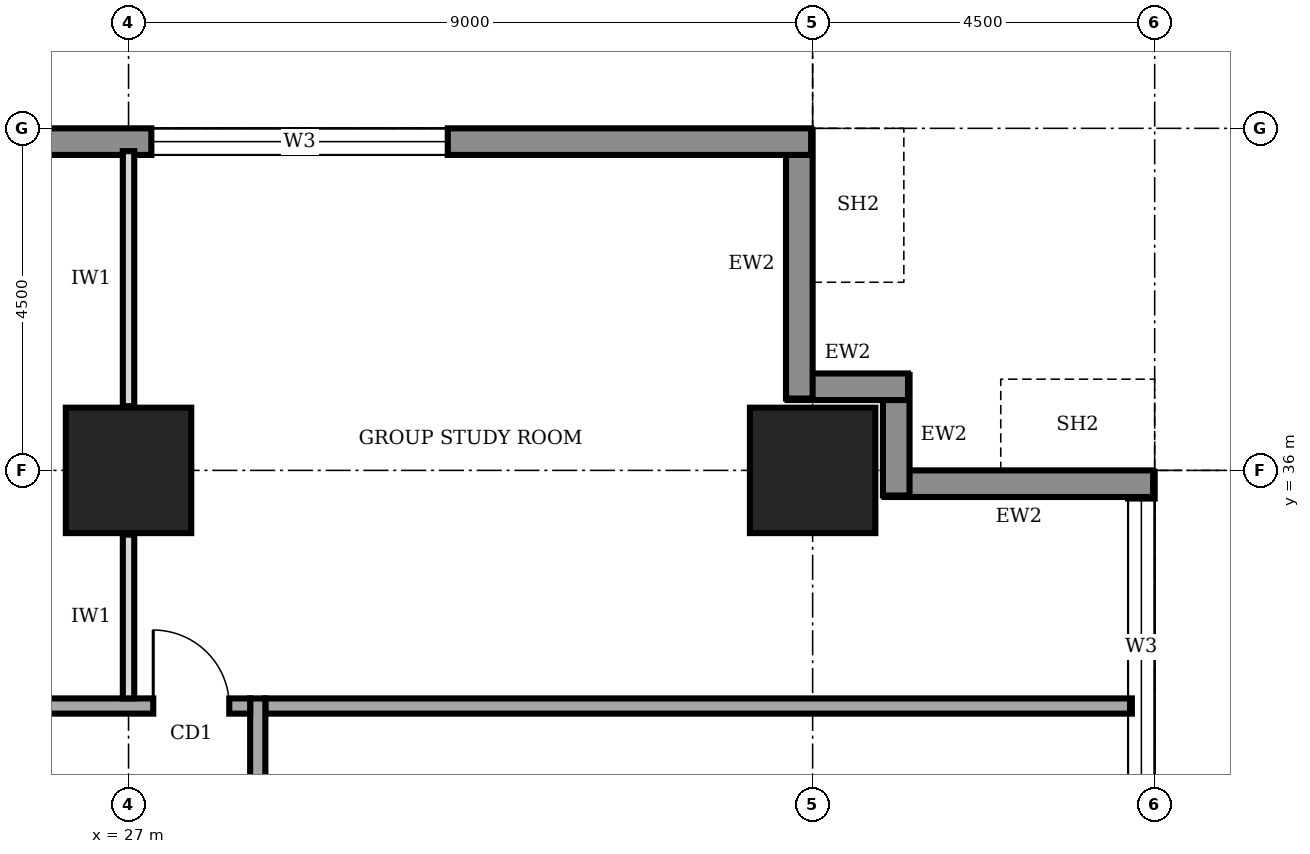
"""IFC4 building model, lengths in metres.
Left out: names, types, materials, properties, quantities, classifications, styles, units other than length and angle.
Written with IfcOpenShell. Run it as: python <this file> out.ifc"""

import sys

from ifc_helpers import new_model, si_unit, direction, frame, frame_2d, origin, origin_2d, place, context, subcontext, project, spatial, rectangle, extrude, element, fill, save


model = new_model("IFC4")
c1 = context("Model", 3, precision=1e-05, world=origin(), true_north=direction((0.0, 1.0)))
c2 = subcontext(c1, "Body", "Model", "MODEL_VIEW")
j1 = project(units=[si_unit("LENGTHUNIT", "METRE"), si_unit("PLANEANGLEUNIT", "RADIAN")], contexts=[c1])
p1 = place(None, origin())
s1 = spatial("IfcSite", under=j1, at=p1, CompositionType="ELEMENT")
p2 = place(p1, origin())
s2 = spatial("IfcBuilding", under=s1, at=p2, CompositionType="ELEMENT")
p3 = place(p2, frame((0.0, 0.0, 197.0)))
s3 = spatial("IfcBuildingStorey", under=s2, at=p3, CompositionType="ELEMENT", Elevation=197.0)
for number, where, z_axis, x_axis in (
    (1, (27.0, 36.0, 0.0), (0.0, 0.0, 1.0), (1.0, 0.0, 0.0)),
    (2, (36.0, 36.0, 0.0), (0.0, 0.0, 1.0), (1.0, 0.0, 0.0)),
):
    element("IfcColumn", number, at=place(p3, frame(where, z_axis=z_axis, x_axis=x_axis)), inside=s3, PredefinedType="COLUMN", context=c2, shape_type="SweptSolid", body=[
        extrude(rectangle(XDim=1.65, YDim=1.65, at=origin_2d()), origin(), (0.0, 0.0, 1.0), 4.0),
    ])
p4 = place(p3, frame((40.325, 4.52, 0.0), z_axis=(0.0, 0.0, 1.0), x_axis=(0.0, 1.0, 0.0)))
e3 = element("IfcWall", 3, at=p4, inside=s3, PredefinedType="STANDARD", context=c2, shape_type="SweptSolid", body=[
    extrude(rectangle(XDim=31.46, YDim=0.35, at=frame_2d((15.73, 0.0))), origin(), (0.0, 0.0, 1.0), 3.75),
])
p5 = place(p4, frame((4.78, 0.0, 0.95)))
e4 = element("IfcOpeningElement", 4, at=p5, cuts=e3, PredefinedType="OPENING", context=c2, shape_type="SweptSolid", body=[
    extrude(rectangle(XDim=3.9, YDim=1.8, at=frame_2d((1.95, 0.9))), frame((0.0, 0.185, 0.0), z_axis=(0.0, -1.0, 0.0), x_axis=(1.0, 0.0, 0.0)), (0.0, 0.0, 1.0), 0.37),
])
p6 = place(p4, frame((9.28, 0.0, 0.95)))
e5 = element("IfcOpeningElement", 5, at=p6, cuts=e3, PredefinedType="OPENING", context=c2, shape_type="SweptSolid", body=[
    extrude(rectangle(XDim=3.9, YDim=1.8, at=frame_2d((1.95, 0.9))), frame((0.0, 0.185, 0.0), z_axis=(0.0, -1.0, 0.0), x_axis=(1.0, 0.0, 0.0)), (0.0, 0.0, 1.0), 0.37),
])
p7 = place(p4, frame((13.78, 0.0, 0.95)))
e6 = element("IfcOpeningElement", 6, at=p7, cuts=e3, PredefinedType="OPENING", context=c2, shape_type="SweptSolid", body=[
    extrude(rectangle(XDim=3.9, YDim=1.8, at=frame_2d((1.95, 0.9))), frame((0.0, 0.185, 0.0), z_axis=(0.0, -1.0, 0.0), x_axis=(1.0, 0.0, 0.0)), (0.0, 0.0, 1.0), 0.37),
])
p8 = place(p4, frame((18.28, 0.0, 0.95)))
e7 = element("IfcOpeningElement", 7, at=p8, cuts=e3, PredefinedType="OPENING", context=c2, shape_type="SweptSolid", body=[
    extrude(rectangle(XDim=3.9, YDim=1.8, at=frame_2d((1.95, 0.9))), frame((0.0, 0.185, 0.0), z_axis=(0.0, -1.0, 0.0), x_axis=(1.0, 0.0, 0.0)), (0.0, 0.0, 1.0), 0.37),
])
p9 = place(p4, frame((22.78, 0.0, 0.95)))
e8 = element("IfcOpeningElement", 8, at=p9, cuts=e3, PredefinedType="OPENING", context=c2, shape_type="SweptSolid", body=[
    extrude(rectangle(XDim=3.9, YDim=1.8, at=frame_2d((1.95, 0.9))), frame((0.0, 0.185, 0.0), z_axis=(0.0, -1.0, 0.0), x_axis=(1.0, 0.0, 0.0)), (0.0, 0.0, 1.0), 0.37),
])
p10 = place(p4, frame((27.21, 0.0, 0.95)))
e9 = element("IfcOpeningElement", 9, at=p10, cuts=e3, PredefinedType="OPENING", context=c2, shape_type="SweptSolid", body=[
    extrude(rectangle(XDim=3.9, YDim=1.8, at=frame_2d((1.95, 0.9))), frame((0.0, 0.185, 0.0), z_axis=(0.0, -1.0, 0.0), x_axis=(1.0, 0.0, 0.0)), (0.0, 0.0, 1.0), 0.37),
])
p11 = place(p3, frame((40.48, 35.825, 0.0), z_axis=(0.0, 0.0, 1.0), x_axis=(-1.0, 0.0, 0.0)))
e10 = element("IfcWall", 10, at=p11, inside=s3, PredefinedType="STANDARD", context=c2, shape_type="SweptSolid", body=[
    extrude(rectangle(XDim=3.535, YDim=0.35, at=frame_2d((1.768, 0.0))), origin(), (0.0, 0.0, 1.0), 2.85),
])
for number, where, z_axis, x_axis in (
    (11, (37.1, 35.67, 0.0), (0.0, 0.0, 1.0), (0.0, 1.0, 0.0)),
    (12, (37.255, 37.1, 0.0), (0.0, 0.0, 1.0), (-1.0, 0.0, 0.0)),
):
    element("IfcWall", number, at=place(p3, frame(where, z_axis=z_axis, x_axis=x_axis)), inside=s3, PredefinedType="STANDARD", context=c2, shape_type="SweptSolid", body=[
        extrude(rectangle(XDim=1.585, YDim=0.35, at=frame_2d((0.792, 0.0))), origin(), (0.0, 0.0, 1.0), 3.75),
    ])
p12 = place(p3, frame((35.825, 36.945, 0.0), z_axis=(0.0, 0.0, 1.0), x_axis=(0.0, 1.0, 0.0)))
e13 = element("IfcWall", 13, at=p12, inside=s3, PredefinedType="STANDARD", context=c2, shape_type="SweptSolid", body=[
    extrude(rectangle(XDim=3.535, YDim=0.35, at=frame_2d((1.768, 0.0))), origin(), (0.0, 0.0, 1.0), 2.85),
])
p13 = place(p3, frame((35.98, 40.325, 0.0), z_axis=(0.0, 0.0, 1.0), x_axis=(-1.0, 0.0, 0.0)))
e14 = element("IfcWall", 14, at=p13, inside=s3, PredefinedType="STANDARD", context=c2, shape_type="SweptSolid", body=[
    extrude(rectangle(XDim=31.46, YDim=0.35, at=frame_2d((15.73, 0.0))), origin(), (0.0, 0.0, 1.0), 3.75),
])
p14 = place(p13, frame((27.21, 0.0, 0.95)))
e15 = element("IfcOpeningElement", 15, at=p14, cuts=e14, PredefinedType="OPENING", context=c2, shape_type="SweptSolid", body=[
    extrude(rectangle(XDim=3.9, YDim=1.8, at=frame_2d((1.95, 0.9))), frame((0.0, 0.185, 0.0), z_axis=(0.0, -1.0, 0.0), x_axis=(1.0, 0.0, 0.0)), (0.0, 0.0, 1.0), 0.37),
])
p15 = place(p13, frame((22.78, 0.0, 0.95)))
e16 = element("IfcOpeningElement", 16, at=p15, cuts=e14, PredefinedType="OPENING", context=c2, shape_type="SweptSolid", body=[
    extrude(rectangle(XDim=3.9, YDim=1.8, at=frame_2d((1.95, 0.9))), frame((0.0, 0.185, 0.0), z_axis=(0.0, -1.0, 0.0), x_axis=(1.0, 0.0, 0.0)), (0.0, 0.0, 1.0), 0.37),
])
p16 = place(p13, frame((4.78, 0.0, 0.95)))
e17 = element("IfcOpeningElement", 17, at=p16, cuts=e14, PredefinedType="OPENING", context=c2, shape_type="SweptSolid", body=[
    extrude(rectangle(XDim=3.9, YDim=1.8, at=frame_2d((1.95, 0.9))), frame((0.0, 0.185, 0.0), z_axis=(0.0, -1.0, 0.0), x_axis=(1.0, 0.0, 0.0)), (0.0, 0.0, 1.0), 0.37),
])
p17 = place(p3, frame((28.7, 7.7, 0.0), z_axis=(0.0, 0.0, 1.0), x_axis=(0.0, 1.0, 0.0)))
e18 = element("IfcWall", 18, at=p17, inside=s3, PredefinedType="SOLIDWALL", context=c2, shape_type="SweptSolid", body=[
    extrude(rectangle(XDim=25.3, YDim=0.2, at=frame_2d((12.65, 0.0))), origin(), (0.0, 0.0, 1.0), 3.75),
])
p18 = place(p17, frame((4.15, 0.0, 0.0)))
e19 = element("IfcOpeningElement", 19, at=p18, cuts=e18, PredefinedType="OPENING", context=c2, shape_type="SweptSolid", body=[
    extrude(rectangle(XDim=1.8, YDim=2.1, at=frame_2d((0.9, 1.05))), frame((0.0, 0.11, 0.0), z_axis=(0.0, -1.0, 0.0), x_axis=(1.0, 0.0, 0.0)), (0.0, 0.0, 1.0), 0.22),
])
p19 = place(p17, frame((17.1, 0.0, 0.0)))
e20 = element("IfcOpeningElement", 20, at=p19, cuts=e18, PredefinedType="OPENING", context=c2, shape_type="SweptSolid", body=[
    extrude(rectangle(XDim=1.4, YDim=2.1, at=frame_2d((0.7, 1.05))), frame((0.0, 0.11, 0.0), z_axis=(0.0, -1.0, 0.0), x_axis=(1.0, 0.0, 0.0)), (0.0, 0.0, 1.0), 0.22),
])
p20 = place(p3, frame((28.6, 32.9, 0.0), z_axis=(0.0, 0.0, 1.0), x_axis=(-1.0, 0.0, 0.0)))
e21 = element("IfcWall", 21, at=p20, inside=s3, PredefinedType="SOLIDWALL", context=c2, shape_type="SweptSolid", body=[
    extrude(rectangle(XDim=16.9, YDim=0.2, at=frame_2d((8.45, 0.0))), origin(), (0.0, 0.0, 1.0), 3.75),
])
p21 = place(p20, frame((15.425, 0.0, 0.0)))
e22 = element("IfcOpeningElement", 22, at=p21, cuts=e21, PredefinedType="OPENING", context=c2, shape_type="SweptSolid", body=[
    extrude(rectangle(XDim=1.0, YDim=2.1, at=frame_2d((0.5, 1.05))), frame((0.0, 0.11, 0.0), z_axis=(0.0, -1.0, 0.0), x_axis=(1.0, 0.0, 0.0)), (0.0, 0.0, 1.0), 0.22),
])
p22 = place(p20, frame((12.35, 0.0, 0.0)))
e23 = element("IfcOpeningElement", 23, at=p22, cuts=e21, PredefinedType="OPENING", context=c2, shape_type="SweptSolid", body=[
    extrude(rectangle(XDim=1.0, YDim=2.1, at=frame_2d((0.5, 1.05))), frame((0.0, 0.11, 0.0), z_axis=(0.0, -1.0, 0.0), x_axis=(1.0, 0.0, 0.0)), (0.0, 0.0, 1.0), 0.22),
])
p23 = place(p20, frame((5.6, 0.0, 0.0)))
e24 = element("IfcOpeningElement", 24, at=p23, cuts=e21, PredefinedType="OPENING", context=c2, shape_type="SweptSolid", body=[
    extrude(rectangle(XDim=1.0, YDim=2.1, at=frame_2d((0.5, 1.05))), frame((0.0, 0.11, 0.0), z_axis=(0.0, -1.0, 0.0), x_axis=(1.0, 0.0, 0.0)), (0.0, 0.0, 1.0), 0.22),
])
p24 = place(p20, frame((0.275, 0.0, 0.0)))
e25 = element("IfcOpeningElement", 25, at=p24, cuts=e21, PredefinedType="OPENING", context=c2, shape_type="SweptSolid", body=[
    extrude(rectangle(XDim=1.0, YDim=2.1, at=frame_2d((0.5, 1.05))), frame((0.0, 0.11, 0.0), z_axis=(0.0, -1.0, 0.0), x_axis=(1.0, 0.0, 0.0)), (0.0, 0.0, 1.0), 0.22),
])
p25 = place(p3, frame((28.8, 32.9, 0.0), z_axis=(0.0, 0.0, 1.0), x_axis=(1.0, 0.0, 0.0)))
e26 = element("IfcWall", 26, at=p25, inside=s3, PredefinedType="SOLIDWALL", context=c2, shape_type="SweptSolid", body=[
    extrude(rectangle(XDim=11.4, YDim=0.2, at=frame_2d((5.7, 0.0))), origin(), (0.0, 0.0, 1.0), 3.75),
])
p26 = place(p3, frame((27.0, 33.0, 0.0), z_axis=(0.0, 0.0, 1.0), x_axis=(0.0, 1.0, 0.0)))
e27 = element("IfcWall", 27, at=p26, inside=s3, PredefinedType="PARTITIONING", context=c2, shape_type="SweptSolid", body=[
    extrude(rectangle(XDim=2.155, YDim=0.15, at=frame_2d((1.078, 0.0))), origin(), (0.0, 0.0, 1.0), 2.85),
])
p27 = place(p3, frame((27.0, 36.845, 0.0), z_axis=(0.0, 0.0, 1.0), x_axis=(0.0, 1.0, 0.0)))
e28 = element("IfcWall", 28, at=p27, inside=s3, PredefinedType="PARTITIONING", context=c2, shape_type="SweptSolid", body=[
    extrude(rectangle(XDim=3.355, YDim=0.15, at=frame_2d((1.677, 0.0))), origin(), (0.0, 0.0, 1.0), 2.85),
])
p28 = place(p10, origin())
e29 = element("IfcWindow", 29, at=p28, inside=s3, PartitioningType="SINGLE_PANEL", PredefinedType="WINDOW", context=c2, shape_type="SweptSolid", body=[
    extrude(rectangle(XDim=3.9, YDim=1.8, at=frame_2d((1.95, 0.9))), frame((0.0, 0.03, 0.0), z_axis=(0.0, -1.0, 0.0), x_axis=(1.0, 0.0, 0.0)), (0.0, 0.0, 1.0), 0.06),
])
fill(e9, e29)
p29 = place(p16, origin())
e30 = element("IfcWindow", 30, at=p29, inside=s3, PartitioningType="SINGLE_PANEL", PredefinedType="WINDOW", context=c2, shape_type="SweptSolid", body=[
    extrude(rectangle(XDim=3.9, YDim=1.8, at=frame_2d((1.95, 0.9))), frame((0.0, 0.03, 0.0), z_axis=(0.0, -1.0, 0.0), x_axis=(1.0, 0.0, 0.0)), (0.0, 0.0, 1.0), 0.06),
])
fill(e17, e30)
p30 = place(p24, frame((1.0, 0.0, 0.0), z_axis=(0.0, 0.0, 1.0), x_axis=(-1.0, 0.0, 0.0)))
e31 = element("IfcDoor", 31, at=p30, inside=s3, OperationType="SINGLE_SWING_LEFT", PredefinedType="DOOR", context=c2, shape_type="SweptSolid", body=[
    extrude(rectangle(XDim=1.0, YDim=2.1, at=frame_2d((0.5, 1.05))), frame((0.0, 0.025, 0.0), z_axis=(0.0, -1.0, 0.0), x_axis=(1.0, 0.0, 0.0)), (0.0, 0.0, 1.0), 0.05),
])
fill(e25, e31)
save(model, sys.argv[1])
